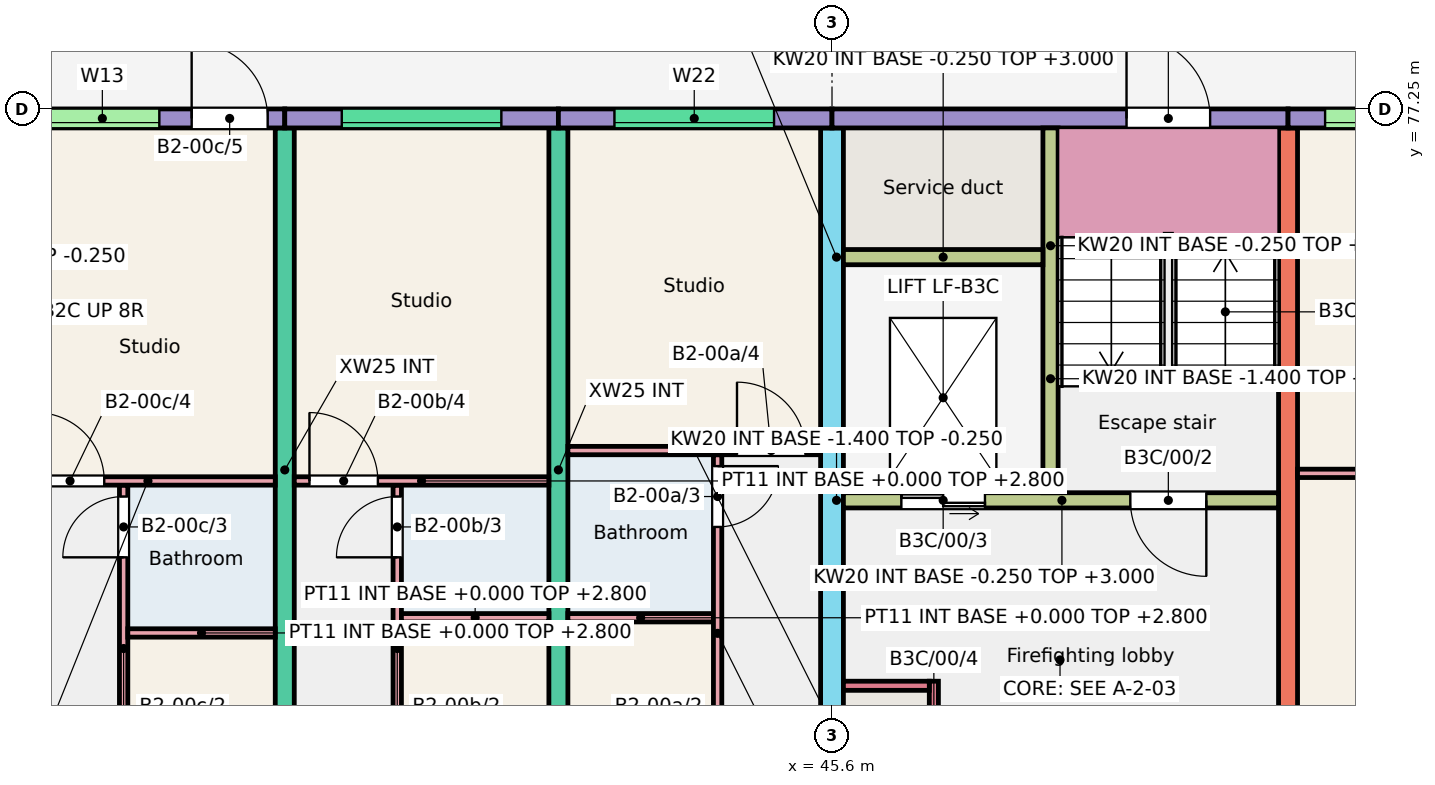
"""IFC4 building model, lengths in metres.
Left out: names, types, materials, properties, quantities, classifications, styles, units other than length and angle.
Written with IfcOpenShell. Run it as: python <this file> out.ifc"""

import sys

from ifc_helpers import new_model, si_unit, direction, frame, frame_2d, origin, place, context, subcontext, project, spatial, rectangle, extrude, element, fill, save


model = new_model("IFC4")
c1 = context("Model", 3, precision=1e-05, world=origin(), true_north=direction((0.0, 1.0)))
c2 = subcontext(c1, "Body", "Model", "MODEL_VIEW")
j1 = project(units=[si_unit("LENGTHUNIT", "METRE"), si_unit("PLANEANGLEUNIT", "RADIAN")], contexts=[c1])
p1 = place(None, origin())
s1 = spatial("IfcSite", under=j1, at=p1, CompositionType="ELEMENT")
p2 = place(p1, origin())
s2 = spatial("IfcBuilding", under=s1, at=p2, CompositionType="ELEMENT")
p3 = place(p2, origin())
s3 = spatial("IfcBuildingStorey", under=s2, at=p3, CompositionType="ELEMENT", Elevation=0.0)
for number, where, z_axis, x_axis in (
    (1, (38.4, 68.0, -0.25), (0.0, 0.0, 1.0), (0.0, 1.0, 0.0)),
    (2, (42.0, 68.0, -0.25), (0.0, 0.0, 1.0), (0.0, 1.0, 0.0)),
):
    element("IfcWall", number, at=place(p3, frame(where, z_axis=z_axis, x_axis=x_axis)), inside=s3, PredefinedType="SHEAR", context=c2, shape_type="SweptSolid", body=[
        extrude(rectangle(XDim=9.0, YDim=0.25, at=frame_2d((4.5, 0.0))), origin(), (0.0, 0.0, 1.0), 3.25),
    ])
p4 = place(p3, frame((45.6, 66.0, -0.25), z_axis=(0.0, 0.0, 1.0), x_axis=(0.0, 1.0, 0.0)))
e3 = element("IfcWall", 3, at=p4, inside=s3, PredefinedType="SHEAR", context=c2, shape_type="SweptSolid", body=[
    extrude(rectangle(XDim=11.0, YDim=0.3, at=frame_2d((5.5, 0.0))), origin(), (0.0, 0.0, 1.0), 3.25),
])
p5 = place(p4, frame((0.3, 0.0, 0.25)))
e4 = element("IfcOpeningElement", 4, at=p5, cuts=e3, PredefinedType="OPENING", context=c2, shape_type="SweptSolid", body=[
    extrude(rectangle(XDim=1.2, YDim=2.1, at=frame_2d((0.6, 1.05))), frame((0.0, 0.16, 0.0), z_axis=(0.0, -1.0, 0.0), x_axis=(1.0, 0.0, 0.0)), (0.0, 0.0, 1.0), 0.32),
])
p6 = place(p3, frame((51.6, 68.0, -0.25), z_axis=(0.0, 0.0, 1.0), x_axis=(0.0, 1.0, 0.0)))
e5 = element("IfcWall", 5, at=p6, inside=s3, PredefinedType="SHEAR", context=c2, shape_type="SweptSolid", body=[
    extrude(rectangle(XDim=9.0, YDim=0.25, at=frame_2d((4.5, 0.0))), origin(), (0.0, 0.0, 1.0), 3.25),
])
p7 = place(p3, frame((34.8, 77.125, -0.25), z_axis=(0.0, 0.0, 1.0), x_axis=(1.0, 0.0, 0.0)))
e6 = element("IfcWall", 6, at=p7, inside=s3, PredefinedType="SOLIDWALL", context=c2, shape_type="SweptSolid", body=[
    extrude(rectangle(XDim=3.6, YDim=0.25, at=frame_2d((1.8, 0.0))), origin(), (0.0, 0.0, 1.0), 3.25),
])
p8 = place(p7, frame((0.45, 0.0, 1.45)))
e7 = element("IfcOpeningElement", 7, at=p8, cuts=e6, PredefinedType="OPENING", context=c2, shape_type="SweptSolid", body=[
    extrude(rectangle(XDim=1.5, YDim=1.2, at=frame_2d((0.75, 0.6))), frame((0.0, 0.135, 0.0), z_axis=(0.0, -1.0, 0.0), x_axis=(1.0, 0.0, 0.0)), (0.0, 0.0, 1.0), 0.27),
])
p9 = place(p7, frame((2.375, 0.0, 0.25)))
e8 = element("IfcOpeningElement", 8, at=p9, cuts=e6, PredefinedType="OPENING", context=c2, shape_type="SweptSolid", body=[
    extrude(rectangle(XDim=1.0, YDim=2.1, at=frame_2d((0.5, 1.05))), frame((0.0, 0.135, 0.0), z_axis=(0.0, -1.0, 0.0), x_axis=(1.0, 0.0, 0.0)), (0.0, 0.0, 1.0), 0.27),
])
p10 = place(p3, frame((38.4, 77.125, -0.25), z_axis=(0.0, 0.0, 1.0), x_axis=(1.0, 0.0, 0.0)))
e9 = element("IfcWall", 9, at=p10, inside=s3, PredefinedType="SOLIDWALL", context=c2, shape_type="SweptSolid", body=[
    extrude(rectangle(XDim=3.6, YDim=0.25, at=frame_2d((1.8, 0.0))), origin(), (0.0, 0.0, 1.0), 3.25),
])
p11 = place(p10, frame((0.75, 0.0, 1.45)))
e10 = element("IfcOpeningElement", 10, at=p11, cuts=e9, PredefinedType="OPENING", context=c2, shape_type="SweptSolid", body=[
    extrude(rectangle(XDim=2.1, YDim=1.2, at=frame_2d((1.05, 0.6))), frame((0.0, 0.135, 0.0), z_axis=(0.0, -1.0, 0.0), x_axis=(1.0, 0.0, 0.0)), (0.0, 0.0, 1.0), 0.27),
])
p12 = place(p3, frame((42.0, 77.125, -0.25), z_axis=(0.0, 0.0, 1.0), x_axis=(1.0, 0.0, 0.0)))
e11 = element("IfcWall", 11, at=p12, inside=s3, PredefinedType="SOLIDWALL", context=c2, shape_type="SweptSolid", body=[
    extrude(rectangle(XDim=3.6, YDim=0.25, at=frame_2d((1.8, 0.0))), origin(), (0.0, 0.0, 1.0), 3.25),
])
p13 = place(p12, frame((0.738, 0.0, 1.45)))
e12 = element("IfcOpeningElement", 12, at=p13, cuts=e11, PredefinedType="OPENING", context=c2, shape_type="SweptSolid", body=[
    extrude(rectangle(XDim=2.1, YDim=1.2, at=frame_2d((1.05, 0.6))), frame((0.0, 0.135, 0.0), z_axis=(0.0, -1.0, 0.0), x_axis=(1.0, 0.0, 0.0)), (0.0, 0.0, 1.0), 0.27),
])
p14 = place(p3, frame((45.6, 77.125, -0.25), z_axis=(0.0, 0.0, 1.0), x_axis=(1.0, 0.0, 0.0)))
e13 = element("IfcWall", 13, at=p14, inside=s3, PredefinedType="SOLIDWALL", context=c2, shape_type="SweptSolid", body=[
    extrude(rectangle(XDim=6.0, YDim=0.25, at=frame_2d((3.0, 0.0))), origin(), (0.0, 0.0, 1.0), 3.25),
])
p15 = place(p14, frame((3.875, 0.0, 0.25)))
e14 = element("IfcOpeningElement", 14, at=p15, cuts=e13, PredefinedType="OPENING", context=c2, shape_type="SweptSolid", body=[
    extrude(rectangle(XDim=1.1, YDim=2.1, at=frame_2d((0.55, 1.05))), frame((0.0, 0.135, 0.0), z_axis=(0.0, -1.0, 0.0), x_axis=(1.0, 0.0, 0.0)), (0.0, 0.0, 1.0), 0.27),
])
p16 = place(p3, frame((45.75, 72.1, -0.25), z_axis=(0.0, 0.0, 1.0), x_axis=(1.0, 0.0, 0.0)))
e15 = element("IfcWall", 15, at=p16, inside=s3, PredefinedType="SHEAR", context=c2, shape_type="SweptSolid", body=[
    extrude(rectangle(XDim=5.725, YDim=0.2, at=frame_2d((2.863, 0.0))), origin(), (0.0, 0.0, 1.0), 3.25),
])
p17 = place(p16, frame((3.775, 0.0, 0.25)))
e16 = element("IfcOpeningElement", 16, at=p17, cuts=e15, PredefinedType="OPENING", context=c2, shape_type="SweptSolid", body=[
    extrude(rectangle(XDim=1.0, YDim=2.1, at=frame_2d((0.5, 1.05))), frame((0.0, 0.11, 0.0), z_axis=(0.0, -1.0, 0.0), x_axis=(1.0, 0.0, 0.0)), (0.0, 0.0, 1.0), 0.22),
])
p18 = place(p16, frame((0.762, 0.0, 0.25)))
e17 = element("IfcOpeningElement", 17, at=p18, cuts=e15, PredefinedType="OPENING", context=c2, shape_type="SweptSolid", body=[
    extrude(rectangle(XDim=1.1, YDim=2.1, at=frame_2d((0.55, 1.05))), frame((0.0, 0.11, 0.0), z_axis=(0.0, -1.0, 0.0), x_axis=(1.0, 0.0, 0.0)), (0.0, 0.0, 1.0), 0.22),
])
p19 = place(p3, frame((48.475, 72.2, -0.25), z_axis=(0.0, 0.0, 1.0), x_axis=(0.0, 1.0, 0.0)))
e18 = element("IfcWall", 18, at=p19, inside=s3, PredefinedType="SHEAR", context=c2, shape_type="SweptSolid", body=[
    extrude(rectangle(XDim=4.8, YDim=0.2, at=frame_2d((2.4, 0.0))), origin(), (0.0, 0.0, 1.0), 3.25),
])
p20 = place(p3, frame((45.75, 75.3, -0.25), z_axis=(0.0, 0.0, 1.0), x_axis=(1.0, 0.0, 0.0)))
e19 = element("IfcWall", 19, at=p20, inside=s3, PredefinedType="SHEAR", context=c2, shape_type="SweptSolid", body=[
    extrude(rectangle(XDim=2.625, YDim=0.2, at=frame_2d((1.312, 0.0))), origin(), (0.0, 0.0, 1.0), 3.25),
])
p21 = place(p3, frame((46.94, 68.0, -0.25), z_axis=(0.0, 0.0, 1.0), x_axis=(0.0, 1.0, 0.0)))
e20 = element("IfcWall", 20, at=p21, inside=s3, PredefinedType="SHEAR", context=c2, shape_type="SweptSolid", body=[
    extrude(rectangle(XDim=1.72, YDim=0.12, at=frame_2d((0.86, 0.0))), origin(), (0.0, 0.0, 1.0), 3.25),
])
p22 = place(p21, frame((0.45, 0.0, 0.25)))
e21 = element("IfcOpeningElement", 21, at=p22, cuts=e20, PredefinedType="OPENING", context=c2, shape_type="SweptSolid", body=[
    extrude(rectangle(XDim=0.9, YDim=2.1, at=frame_2d((0.45, 1.05))), frame((0.0, 0.07, 0.0), z_axis=(0.0, -1.0, 0.0), x_axis=(1.0, 0.0, 0.0)), (0.0, 0.0, 1.0), 0.14),
])
p23 = place(p3, frame((45.75, 69.66, -0.25), z_axis=(0.0, 0.0, 1.0), x_axis=(1.0, 0.0, 0.0)))
e22 = element("IfcWall", 22, at=p23, inside=s3, PredefinedType="SHEAR", context=c2, shape_type="SweptSolid", body=[
    extrude(rectangle(XDim=1.13, YDim=0.12, at=frame_2d((0.565, 0.0))), origin(), (0.0, 0.0, 1.0), 3.25),
])
p24 = place(p3, frame((51.6, 77.125, -0.25), z_axis=(0.0, 0.0, 1.0), x_axis=(1.0, 0.0, 0.0)))
e23 = element("IfcWall", 23, at=p24, inside=s3, PredefinedType="SOLIDWALL", context=c2, shape_type="SweptSolid", body=[
    extrude(rectangle(XDim=3.6, YDim=0.25, at=frame_2d((1.8, 0.0))), origin(), (0.0, 0.0, 1.0), 3.25),
])
p25 = place(p24, frame((0.488, 0.0, 1.45)))
e24 = element("IfcOpeningElement", 24, at=p25, cuts=e23, PredefinedType="OPENING", context=c2, shape_type="SweptSolid", body=[
    extrude(rectangle(XDim=1.5, YDim=1.2, at=frame_2d((0.75, 0.6))), frame((0.0, 0.135, 0.0), z_axis=(0.0, -1.0, 0.0), x_axis=(1.0, 0.0, 0.0)), (0.0, 0.0, 1.0), 0.27),
])
p26 = place(p24, frame((2.45, 0.0, 0.25)))
e25 = element("IfcOpeningElement", 25, at=p26, cuts=e23, PredefinedType="OPENING", context=c2, shape_type="SweptSolid", body=[
    extrude(rectangle(XDim=1.0, YDim=2.1, at=frame_2d((0.5, 1.05))), frame((0.0, 0.135, 0.0), z_axis=(0.0, -1.0, 0.0), x_axis=(1.0, 0.0, 0.0)), (0.0, 0.0, 1.0), 0.27),
])
for number, where, z_axis, x_axis in (
    (26, (45.6, 72.1, -1.4), (0.0, 0.0, 1.0), (1.0, 0.0, 0.0)),
    (27, (45.6, 75.3, -1.4), (0.0, 0.0, 1.0), (1.0, 0.0, 0.0)),
):
    element("IfcWall", number, at=place(p3, frame(where, z_axis=z_axis, x_axis=x_axis)), inside=s3, PredefinedType="SHEAR", context=c2, shape_type="SweptSolid", body=[
        extrude(rectangle(XDim=2.975, YDim=0.2, at=frame_2d((1.487, 0.0))), origin(), (0.0, 0.0, 1.0), 1.15),
    ])
p27 = place(p3, frame((48.475, 72.2, -1.4), z_axis=(0.0, 0.0, 1.0), x_axis=(0.0, 1.0, 0.0)))
e28 = element("IfcWall", 28, at=p27, inside=s3, PredefinedType="SHEAR", context=c2, shape_type="SweptSolid", body=[
    extrude(rectangle(XDim=3.0, YDim=0.2, at=frame_2d((1.5, 0.0))), origin(), (0.0, 0.0, 1.0), 1.15),
])
p28 = place(p3, frame((45.675, 72.2, -1.4), z_axis=(0.0, 0.0, 1.0), x_axis=(0.0, 1.0, 0.0)))
e29 = element("IfcWall", 29, at=p28, inside=s3, PredefinedType="SHEAR", context=c2, shape_type="SweptSolid", body=[
    extrude(rectangle(XDim=3.0, YDim=0.15, at=frame_2d((1.5, 0.0))), origin(), (0.0, 0.0, 1.0), 1.15),
])
p29 = place(p3, frame((42.125, 70.555, 0.0), z_axis=(0.0, 0.0, 1.0), x_axis=(1.0, 0.0, 0.0)))
e30 = element("IfcWall", 30, at=p29, inside=s3, PredefinedType="PARTITIONING", context=c2, shape_type="SweptSolid", body=[
    extrude(rectangle(XDim=1.915, YDim=0.11, at=frame_2d((0.958, 0.0))), origin(), (0.0, 0.0, 1.0), 2.8),
])
p30 = place(p3, frame((44.095, 68.0, 0.0), z_axis=(0.0, 0.0, 1.0), x_axis=(0.0, 1.0, 0.0)))
e31 = element("IfcWall", 31, at=p30, inside=s3, PredefinedType="PARTITIONING", context=c2, shape_type="SweptSolid", body=[
    extrude(rectangle(XDim=4.7, YDim=0.11, at=frame_2d((2.35, 0.0))), origin(), (0.0, 0.0, 1.0), 2.8),
])
p31 = place(p30, frame((0.2, 0.0, 0.0)))
e32 = element("IfcOpeningElement", 32, at=p31, cuts=e31, PredefinedType="OPENING", context=c2, shape_type="SweptSolid", body=[
    extrude(rectangle(XDim=0.8, YDim=2.1, at=frame_2d((0.4, 1.05))), frame((0.0, 0.065, 0.0), z_axis=(0.0, -1.0, 0.0), x_axis=(1.0, 0.0, 0.0)), (0.0, 0.0, 1.0), 0.13),
])
p32 = place(p30, frame((3.75, 0.0, 0.0)))
e33 = element("IfcOpeningElement", 33, at=p32, cuts=e31, PredefinedType="OPENING", context=c2, shape_type="SweptSolid", body=[
    extrude(rectangle(XDim=0.8, YDim=2.1, at=frame_2d((0.4, 1.05))), frame((0.0, 0.065, 0.0), z_axis=(0.0, -1.0, 0.0), x_axis=(1.0, 0.0, 0.0)), (0.0, 0.0, 1.0), 0.13),
])
p33 = place(p3, frame((42.125, 72.755, 0.0), z_axis=(0.0, 0.0, 1.0), x_axis=(1.0, 0.0, 0.0)))
e34 = element("IfcWall", 34, at=p33, inside=s3, PredefinedType="PARTITIONING", context=c2, shape_type="SweptSolid", body=[
    extrude(rectangle(XDim=3.325, YDim=0.11, at=frame_2d((1.663, 0.0))), origin(), (0.0, 0.0, 1.0), 2.8),
])
p34 = place(p33, frame((2.225, 0.0, 0.0)))
e35 = element("IfcOpeningElement", 35, at=p34, cuts=e34, PredefinedType="OPENING", context=c2, shape_type="SweptSolid", body=[
    extrude(rectangle(XDim=0.9, YDim=2.1, at=frame_2d((0.45, 1.05))), frame((0.0, 0.065, 0.0), z_axis=(0.0, -1.0, 0.0), x_axis=(1.0, 0.0, 0.0)), (0.0, 0.0, 1.0), 0.13),
])
p35 = place(p3, frame((39.88, 68.0, 0.0), z_axis=(0.0, 0.0, 1.0), x_axis=(0.0, 1.0, 0.0)))
e36 = element("IfcWall", 36, at=p35, inside=s3, PredefinedType="PARTITIONING", context=c2, shape_type="SweptSolid", body=[
    extrude(rectangle(XDim=4.3, YDim=0.11, at=frame_2d((2.15, 0.0))), origin(), (0.0, 0.0, 1.0), 2.8),
])
p36 = place(p35, frame((0.2, 0.0, 0.0)))
e37 = element("IfcOpeningElement", 37, at=p36, cuts=e36, PredefinedType="OPENING", context=c2, shape_type="SweptSolid", body=[
    extrude(rectangle(XDim=0.8, YDim=2.1, at=frame_2d((0.4, 1.05))), frame((0.0, 0.065, 0.0), z_axis=(0.0, -1.0, 0.0), x_axis=(1.0, 0.0, 0.0)), (0.0, 0.0, 1.0), 0.13),
])
p37 = place(p35, frame((3.35, 0.0, 0.0)))
e38 = element("IfcOpeningElement", 38, at=p37, cuts=e36, PredefinedType="OPENING", context=c2, shape_type="SweptSolid", body=[
    extrude(rectangle(XDim=0.8, YDim=2.1, at=frame_2d((0.4, 1.05))), frame((0.0, 0.065, 0.0), z_axis=(0.0, -1.0, 0.0), x_axis=(1.0, 0.0, 0.0)), (0.0, 0.0, 1.0), 0.13),
])
p38 = place(p3, frame((39.935, 70.555, 0.0), z_axis=(0.0, 0.0, 1.0), x_axis=(1.0, 0.0, 0.0)))
e39 = element("IfcWall", 39, at=p38, inside=s3, PredefinedType="PARTITIONING", context=c2, shape_type="SweptSolid", body=[
    extrude(rectangle(XDim=1.94, YDim=0.11, at=frame_2d((0.97, 0.0))), origin(), (0.0, 0.0, 1.0), 2.8),
])
p39 = place(p3, frame((38.525, 72.355, 0.0), z_axis=(0.0, 0.0, 1.0), x_axis=(1.0, 0.0, 0.0)))
e40 = element("IfcWall", 40, at=p39, inside=s3, PredefinedType="PARTITIONING", context=c2, shape_type="SweptSolid", body=[
    extrude(rectangle(XDim=3.35, YDim=0.11, at=frame_2d((1.675, 0.0))), origin(), (0.0, 0.0, 1.0), 2.8),
])
p40 = place(p39, frame((0.2, 0.0, 0.0)))
e41 = element("IfcOpeningElement", 41, at=p40, cuts=e40, PredefinedType="OPENING", context=c2, shape_type="SweptSolid", body=[
    extrude(rectangle(XDim=0.9, YDim=2.1, at=frame_2d((0.45, 1.05))), frame((0.0, 0.065, 0.0), z_axis=(0.0, -1.0, 0.0), x_axis=(1.0, 0.0, 0.0)), (0.0, 0.0, 1.0), 0.13),
])
p41 = place(p3, frame((36.28, 68.0, 0.0), z_axis=(0.0, 0.0, 1.0), x_axis=(0.0, 1.0, 0.0)))
e42 = element("IfcWall", 42, at=p41, inside=s3, PredefinedType="PARTITIONING", context=c2, shape_type="SweptSolid", body=[
    extrude(rectangle(XDim=4.3, YDim=0.11, at=frame_2d((2.15, 0.0))), origin(), (0.0, 0.0, 1.0), 2.8),
])
p42 = place(p41, frame((0.2, 0.0, 0.0)))
e43 = element("IfcOpeningElement", 43, at=p42, cuts=e42, PredefinedType="OPENING", context=c2, shape_type="SweptSolid", body=[
    extrude(rectangle(XDim=0.8, YDim=2.1, at=frame_2d((0.4, 1.05))), frame((0.0, 0.065, 0.0), z_axis=(0.0, -1.0, 0.0), x_axis=(1.0, 0.0, 0.0)), (0.0, 0.0, 1.0), 0.13),
])
p43 = place(p41, frame((3.35, 0.0, 0.0)))
e44 = element("IfcOpeningElement", 44, at=p43, cuts=e42, PredefinedType="OPENING", context=c2, shape_type="SweptSolid", body=[
    extrude(rectangle(XDim=0.8, YDim=2.1, at=frame_2d((0.4, 1.05))), frame((0.0, 0.065, 0.0), z_axis=(0.0, -1.0, 0.0), x_axis=(1.0, 0.0, 0.0)), (0.0, 0.0, 1.0), 0.13),
])
p44 = place(p3, frame((36.335, 70.355, 0.0), z_axis=(0.0, 0.0, 1.0), x_axis=(1.0, 0.0, 0.0)))
e45 = element("IfcWall", 45, at=p44, inside=s3, PredefinedType="PARTITIONING", context=c2, shape_type="SweptSolid", body=[
    extrude(rectangle(XDim=1.94, YDim=0.11, at=frame_2d((0.97, 0.0))), origin(), (0.0, 0.0, 1.0), 2.8),
])
p45 = place(p3, frame((34.925, 72.355, 0.0), z_axis=(0.0, 0.0, 1.0), x_axis=(1.0, 0.0, 0.0)))
e46 = element("IfcWall", 46, at=p45, inside=s3, PredefinedType="PARTITIONING", context=c2, shape_type="SweptSolid", body=[
    extrude(rectangle(XDim=3.35, YDim=0.11, at=frame_2d((1.675, 0.0))), origin(), (0.0, 0.0, 1.0), 2.8),
])
p46 = place(p45, frame((0.2, 0.0, 0.0)))
e47 = element("IfcOpeningElement", 47, at=p46, cuts=e46, PredefinedType="OPENING", context=c2, shape_type="SweptSolid", body=[
    extrude(rectangle(XDim=0.9, YDim=2.1, at=frame_2d((0.45, 1.05))), frame((0.0, 0.065, 0.0), z_axis=(0.0, -1.0, 0.0), x_axis=(1.0, 0.0, 0.0)), (0.0, 0.0, 1.0), 0.13),
])
p47 = place(p3, frame((51.725, 72.455, 0.0), z_axis=(0.0, 0.0, 1.0), x_axis=(1.0, 0.0, 0.0)))
e48 = element("IfcWall", 48, at=p47, inside=s3, PredefinedType="PARTITIONING", context=c2, shape_type="SweptSolid", body=[
    extrude(rectangle(XDim=3.375, YDim=0.11, at=frame_2d((1.688, 0.0))), origin(), (0.0, 0.0, 1.0), 2.8),
])
p48 = place(p13, origin())
e49 = element("IfcWindow", 49, at=p48, inside=s3, PartitioningType="SINGLE_PANEL", PredefinedType="WINDOW", context=c2, shape_type="SweptSolid", body=[
    extrude(rectangle(XDim=2.1, YDim=1.2, at=frame_2d((1.05, 0.6))), frame((0.0, -0.025, 0.0), z_axis=(0.0, -1.0, 0.0), x_axis=(1.0, 0.0, 0.0)), (0.0, 0.0, 1.0), 0.06),
])
fill(e12, e49)
p49 = place(p11, origin())
e50 = element("IfcWindow", 50, at=p49, inside=s3, PartitioningType="SINGLE_PANEL", PredefinedType="WINDOW", context=c2, shape_type="SweptSolid", body=[
    extrude(rectangle(XDim=2.1, YDim=1.2, at=frame_2d((1.05, 0.6))), frame((0.0, -0.025, 0.0), z_axis=(0.0, -1.0, 0.0), x_axis=(1.0, 0.0, 0.0)), (0.0, 0.0, 1.0), 0.06),
])
fill(e10, e50)
p50 = place(p8, origin())
e51 = element("IfcWindow", 51, at=p50, inside=s3, PartitioningType="SINGLE_PANEL", PredefinedType="WINDOW", context=c2, shape_type="SweptSolid", body=[
    extrude(rectangle(XDim=1.5, YDim=1.2, at=frame_2d((0.75, 0.6))), frame((0.0, -0.025, 0.0), z_axis=(0.0, -1.0, 0.0), x_axis=(1.0, 0.0, 0.0)), (0.0, 0.0, 1.0), 0.06),
])
fill(e7, e51)
p51 = place(p25, origin())
e52 = element("IfcWindow", 52, at=p51, inside=s3, PartitioningType="SINGLE_PANEL", PredefinedType="WINDOW", context=c2, shape_type="SweptSolid", body=[
    extrude(rectangle(XDim=1.5, YDim=1.2, at=frame_2d((0.75, 0.6))), frame((0.0, -0.025, 0.0), z_axis=(0.0, -1.0, 0.0), x_axis=(1.0, 0.0, 0.0)), (0.0, 0.0, 1.0), 0.06),
])
fill(e24, e52)
p52 = place(p32, origin())
e53 = element("IfcDoor", 53, at=p52, inside=s3, OperationType="SINGLE_SWING_RIGHT", PredefinedType="DOOR", context=c2, shape_type="SweptSolid", body=[
    extrude(rectangle(XDim=0.8, YDim=2.1, at=frame_2d((0.4, 1.05))), frame((0.0, 0.025, 0.0), z_axis=(0.0, -1.0, 0.0), x_axis=(1.0, 0.0, 0.0)), (0.0, 0.0, 1.0), 0.05),
])
fill(e33, e53)
p53 = place(p34, origin())
e54 = element("IfcDoor", 54, at=p53, inside=s3, OperationType="SINGLE_SWING_LEFT", PredefinedType="DOOR", context=c2, shape_type="SweptSolid", body=[
    extrude(rectangle(XDim=0.9, YDim=2.1, at=frame_2d((0.45, 1.05))), frame((0.0, 0.025, 0.0), z_axis=(0.0, -1.0, 0.0), x_axis=(1.0, 0.0, 0.0)), (0.0, 0.0, 1.0), 0.05),
])
fill(e35, e54)
p54 = place(p37, origin())
e55 = element("IfcDoor", 55, at=p54, inside=s3, OperationType="SINGLE_SWING_LEFT", PredefinedType="DOOR", context=c2, shape_type="SweptSolid", body=[
    extrude(rectangle(XDim=0.8, YDim=2.1, at=frame_2d((0.4, 1.05))), frame((0.0, 0.025, 0.0), z_axis=(0.0, -1.0, 0.0), x_axis=(1.0, 0.0, 0.0)), (0.0, 0.0, 1.0), 0.05),
])
fill(e38, e55)
p55 = place(p40, origin())
e56 = element("IfcDoor", 56, at=p55, inside=s3, OperationType="SINGLE_SWING_LEFT", PredefinedType="DOOR", context=c2, shape_type="SweptSolid", body=[
    extrude(rectangle(XDim=0.9, YDim=2.1, at=frame_2d((0.45, 1.05))), frame((0.0, 0.025, 0.0), z_axis=(0.0, -1.0, 0.0), x_axis=(1.0, 0.0, 0.0)), (0.0, 0.0, 1.0), 0.05),
])
fill(e41, e56)
p56 = place(p43, origin())
e57 = element("IfcDoor", 57, at=p56, inside=s3, OperationType="SINGLE_SWING_LEFT", PredefinedType="DOOR", context=c2, shape_type="SweptSolid", body=[
    extrude(rectangle(XDim=0.8, YDim=2.1, at=frame_2d((0.4, 1.05))), frame((0.0, 0.025, 0.0), z_axis=(0.0, -1.0, 0.0), x_axis=(1.0, 0.0, 0.0)), (0.0, 0.0, 1.0), 0.05),
])
fill(e44, e57)
p57 = place(p46, origin())
e58 = element("IfcDoor", 58, at=p57, inside=s3, OperationType="SINGLE_SWING_LEFT", PredefinedType="DOOR", context=c2, shape_type="SweptSolid", body=[
    extrude(rectangle(XDim=0.9, YDim=2.1, at=frame_2d((0.45, 1.05))), frame((0.0, 0.025, 0.0), z_axis=(0.0, -1.0, 0.0), x_axis=(1.0, 0.0, 0.0)), (0.0, 0.0, 1.0), 0.05),
])
fill(e47, e58)
p58 = place(p9, origin())
e59 = element("IfcDoor", 59, at=p58, inside=s3, OperationType="SINGLE_SWING_LEFT", PredefinedType="DOOR", context=c2, shape_type="SweptSolid", body=[
    extrude(rectangle(XDim=1.0, YDim=2.1, at=frame_2d((0.5, 1.05))), frame((0.0, 0.025, 0.0), z_axis=(0.0, -1.0, 0.0), x_axis=(1.0, 0.0, 0.0)), (0.0, 0.0, 1.0), 0.05),
])
fill(e8, e59)
p59 = place(p17, origin())
e60 = element("IfcDoor", 60, at=p59, inside=s3, OperationType="SINGLE_SWING_RIGHT", PredefinedType="DOOR", context=c2, shape_type="SweptSolid", body=[
    extrude(rectangle(XDim=1.0, YDim=2.1, at=frame_2d((0.5, 1.05))), frame((0.0, 0.025, 0.0), z_axis=(0.0, -1.0, 0.0), x_axis=(1.0, 0.0, 0.0)), (0.0, 0.0, 1.0), 0.05),
])
fill(e16, e60)
p60 = place(p18, origin())
e61 = element("IfcDoor", 61, at=p60, inside=s3, OperationType="DOUBLE_DOOR_SLIDING", PredefinedType="DOOR", context=c2, shape_type="SweptSolid", body=[
    extrude(rectangle(XDim=1.1, YDim=2.1, at=frame_2d((0.55, 1.05))), frame((0.0, 0.025, 0.0), z_axis=(0.0, -1.0, 0.0), x_axis=(1.0, 0.0, 0.0)), (0.0, 0.0, 1.0), 0.05),
])
fill(e17, e61)
p61 = place(p15, origin())
e62 = element("IfcDoor", 62, at=p61, inside=s3, OperationType="SINGLE_SWING_LEFT", PredefinedType="DOOR", context=c2, shape_type="SweptSolid", body=[
    extrude(rectangle(XDim=1.1, YDim=2.1, at=frame_2d((0.55, 1.05))), frame((0.0, 0.025, 0.0), z_axis=(0.0, -1.0, 0.0), x_axis=(1.0, 0.0, 0.0)), (0.0, 0.0, 1.0), 0.05),
])
fill(e14, e62)
save(model, sys.argv[1])
